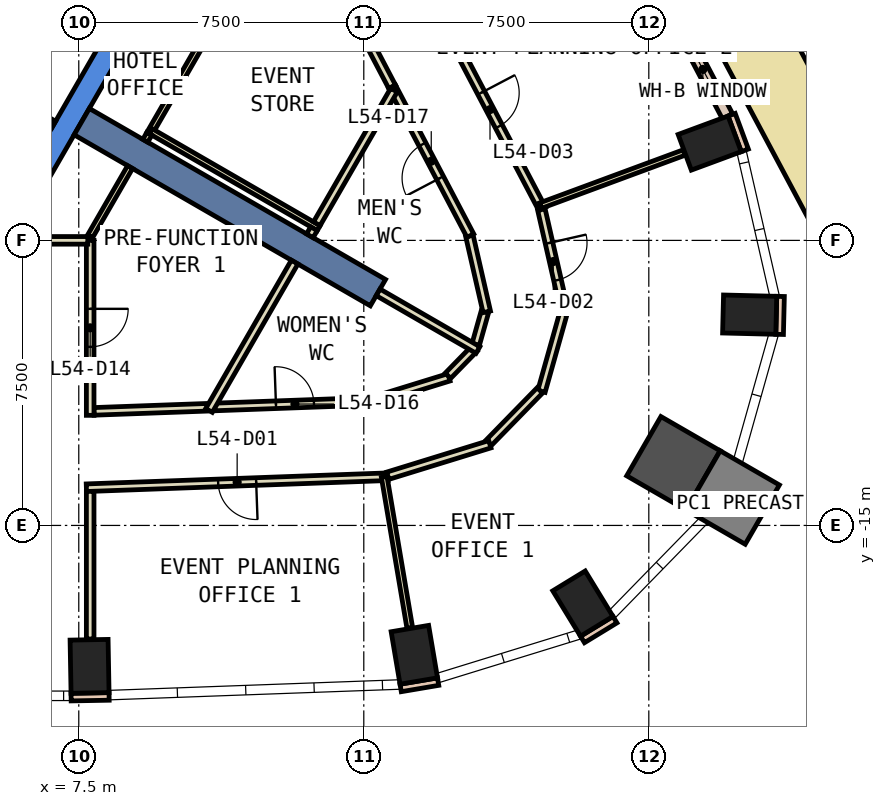
"""IFC4 building model, lengths in metres.
Left out: names, types, materials, properties, quantities, classifications, styles, units other than length and angle.
Written with IfcOpenShell. Run it as: python <this file> out.ifc"""

import sys

from ifc_helpers import new_model, si_unit, direction, frame, frame_2d, origin, origin_2d, place, context, subcontext, project, spatial, polyline, rectangle, outline, extrude, element, fill, save


model = new_model("IFC4")
c1 = context("Model", 3, precision=1e-05, world=origin(), true_north=direction((0.0, 1.0)))
c2 = subcontext(c1, "Body", "Model", "MODEL_VIEW")
j1 = project(units=[si_unit("LENGTHUNIT", "METRE"), si_unit("PLANEANGLEUNIT", "RADIAN")], contexts=[c1])
p1 = place(None, origin())
s1 = spatial("IfcSite", under=j1, at=p1, CompositionType="ELEMENT")
p2 = place(p1, origin())
s2 = spatial("IfcBuilding", under=s1, at=p2, CompositionType="ELEMENT")
p3 = place(p2, frame((0.0, 0.0, 241.4)))
s3 = spatial("IfcBuildingStorey", under=s2, at=p3, CompositionType="ELEMENT", Elevation=241.4)
for number, where, z_axis, x_axis in (
    (1, (7.784, -18.708, 0.0), (0.0, 0.0, 1.0), (1.0, 0.018, 0.0)),
    (2, (16.33, -18.404, 0.0), (0.0, 0.0, 1.0), (0.986, 0.167, 0.0)),
    (3, (20.765, -17.057, 0.0), (0.0, 0.0, 1.0), (0.853, 0.521, 0.0)),
):
    element("IfcColumn", number, at=place(p3, frame(where, z_axis=z_axis, x_axis=x_axis)), inside=s3, PredefinedType="COLUMN", context=c2, shape_type="SweptSolid", body=[
        extrude(rectangle(XDim=1.0, YDim=1.4, at=origin_2d()), origin(), (0.0, 0.0, 1.0), 3.26),
    ])
p4 = place(p3, frame((23.148, -13.365, 0.0), z_axis=(0.0, 0.0, 1.0), x_axis=(-0.866025403784, 0.5, 0.0)))
e4 = element("IfcColumn", 4, at=p4, inside=s3, PredefinedType="COLUMN", context=c2, shape_type="SweptSolid", body=[
    extrude(rectangle(XDim=1.8, YDim=1.8, at=origin_2d()), origin(), (0.0, 0.0, 1.0), 3.26),
])
for number, where, z_axis, x_axis in (
    (5, (25.154, -9.454, 0.0), (0.0, 0.0, 1.0), (0.025, 1.0, 0.0)),
    (6, (24.102, -4.939, 0.0), (0.0, 0.0, 1.0), (-0.347, 0.938, 0.0)),
):
    element("IfcColumn", number, at=place(p3, frame(where, z_axis=z_axis, x_axis=x_axis)), inside=s3, PredefinedType="COLUMN", context=c2, shape_type="SweptSolid", body=[
        extrude(rectangle(XDim=1.0, YDim=1.4, at=origin_2d()), origin(), (0.0, 0.0, 1.0), 3.26),
    ])
p5 = place(p3, frame((24.707, -14.265, 0.0), z_axis=(0.0, 0.0, 1.0), x_axis=(-0.866025403784, 0.5, 0.0)))
e7 = element("IfcColumn", 7, at=p5, inside=s3, PredefinedType="COLUMN", context=c2, shape_type="SweptSolid", body=[
    extrude(rectangle(XDim=1.8, YDim=1.8, at=origin_2d()), origin(), (0.0, 0.0, 1.0), 3.26),
])
p6 = place(p3, frame((0.0, 0.0, -0.6)))
e8 = element("IfcWall", 8, at=p6, inside=s3, PredefinedType="SHEAR", context=c2, shape_type="SweptSolid", body=[
    extrude(outline(polyline([(5.774, -7.5), (11.547, 2.5), (10.854, 2.5), (5.427, -6.9), (5.774, -7.5)])), origin(), (0.0, 0.0, 1.0), 3.86),
])
p7 = place(p3, frame((7.578, -4.375, -0.6), z_axis=(0.0, 0.0, 1.0), x_axis=(0.866024315419, -0.5000018851, 0.0)))
e9 = element("IfcWall", 9, at=p7, inside=s3, PredefinedType="SHEAR", context=c2, shape_type="SweptSolid", body=[
    extrude(rectangle(XDim=9.0, YDim=0.8, at=frame_2d((4.5, 0.0))), origin(), (0.0, 0.0, 1.0), 3.86),
])
p8 = place(p3, frame((25.026, -5.131, 0.0), z_axis=(0.0, 0.0, 1.0), x_axis=(-0.346892928577, 0.937904737222, 0.0)))
e10 = element("IfcWall", 10, at=p8, inside=s3, PredefinedType="STANDARD", context=c2, shape_type="SweptSolid", body=[
    extrude(rectangle(XDim=1.0, YDim=0.2, at=frame_2d((0.5, 0.0))), origin(), (0.0, 0.0, 1.0), 3.26),
])
for number, where, z_axis, x_axis in (
    (11, (7.298, -19.517, 0.0), (0.0, 0.0, 1.0), (1.0, 0.018, 0.0)),
    (12, (15.97, -19.276, 0.0), (0.0, 0.0, 1.0), (0.986, 0.167, 0.0)),
):
    element("IfcWall", number, at=place(p3, frame(where, z_axis=z_axis, x_axis=x_axis)), inside=s3, PredefinedType="STANDARD", context=c2, shape_type="SweptSolid", body=[
        extrude(rectangle(XDim=1.0, YDim=0.2, at=frame_2d((0.5, 0.0))), origin(), (0.0, 0.0, 1.0), 3.26),
    ])
p9 = place(p3, frame((20.755, -18.0, 0.0), z_axis=(0.0, 0.0, 1.0), x_axis=(0.853679739553, 0.520798331677, 0.0)))
e13 = element("IfcWall", 13, at=p9, inside=s3, PredefinedType="STANDARD", context=c2, shape_type="SweptSolid", body=[
    extrude(rectangle(XDim=1.0, YDim=0.2, at=frame_2d((0.5, 0.0))), origin(), (0.0, 0.0, 1.0), 3.26),
])
p10 = place(p3, frame((25.942, -9.973, 0.0), z_axis=(0.0, 0.0, 1.0), x_axis=(0.024192379573, 0.999707321555, 0.0)))
e14 = element("IfcWall", 14, at=p10, inside=s3, PredefinedType="STANDARD", context=c2, shape_type="SweptSolid", body=[
    extrude(rectangle(XDim=0.999, YDim=0.2, at=frame_2d((0.5, 0.0))), origin(), (0.0, 0.0, 1.0), 3.26),
])
p11 = place(p3, frame((24.57, -4.234, 0.0), z_axis=(0.0, 0.0, 1.0), x_axis=(-0.465228032148, 0.885190871001, 0.0)))
e15 = element("IfcWall", 15, at=p11, inside=s3, PredefinedType="STANDARD", context=c2, shape_type="SweptSolid", body=[
    extrude(rectangle(XDim=5.572, YDim=0.3, at=frame_2d((2.786, 0.0))), origin(), (0.0, 0.0, 1.0), 3.26),
])
p12 = place(p11, frame((0.693, 0.0, 0.9)))
e16 = element("IfcOpeningElement", 16, at=p12, cuts=e15, PredefinedType="OPENING", context=c2, shape_type="SweptSolid", body=[
    extrude(rectangle(XDim=1.4, YDim=2.0, at=frame_2d((0.7, 1.0))), frame((0.0, 0.16, 0.0), z_axis=(0.0, -1.0, 0.0), x_axis=(1.0, 0.0, 0.0)), (0.0, 0.0, 1.0), 0.32),
])
p13 = place(p11, frame((3.479, 0.0, 0.9)))
e17 = element("IfcOpeningElement", 17, at=p13, cuts=e15, PredefinedType="OPENING", context=c2, shape_type="SweptSolid", body=[
    extrude(rectangle(XDim=1.4, YDim=2.0, at=frame_2d((0.7, 1.0))), frame((0.0, 0.16, 0.0), z_axis=(0.0, -1.0, 0.0), x_axis=(1.0, 0.0, 0.0)), (0.0, 0.0, 1.0), 0.32),
])
p14 = place(p3, frame((27.604, -6.606, 0.0), z_axis=(0.0, 0.0, 1.0), x_axis=(-0.470628729942, 0.882331342837, 0.0)))
e18 = element("IfcWall", 18, at=p14, inside=s3, PredefinedType="STANDARD", context=c2, shape_type="SweptSolid", body=[
    extrude(rectangle(XDim=5.946, YDim=1.9, at=frame_2d((2.973, 0.0))), origin(), (0.0, 0.0, 1.0), 0.8),
])
p15 = place(p3, frame((7.9, -11.999, 0.0), z_axis=(0.0, 0.0, 1.0), x_axis=(0.999343711998, 0.036223546064, 0.0)))
e19 = element("IfcWall", 19, at=p15, inside=s3, PredefinedType="PARTITIONING", context=c2, shape_type="SweptSolid", body=[
    extrude(rectangle(XDim=2.979, YDim=0.2, at=frame_2d((1.49, 0.0))), origin(), (0.0, 0.0, 1.0), 3.26),
])
p16 = place(p3, frame((15.746, -3.458, 0.0), z_axis=(0.0, 0.0, 1.0), x_axis=(-0.464794189951, 0.885418748948, 0.0)))
e20 = element("IfcWall", 20, at=p16, inside=s3, PredefinedType="PARTITIONING", context=c2, shape_type="SweptSolid", body=[
    extrude(rectangle(XDim=1.205, YDim=0.2, at=frame_2d((0.603, 0.0))), origin(), (0.0, 0.0, 1.0), 3.26),
])
p17 = place(p3, frame((11.077, -11.883, 0.0), z_axis=(0.0, 0.0, 1.0), x_axis=(0.999335333519, 0.036453959732, 0.0)))
e21 = element("IfcWall", 21, at=p17, inside=s3, PredefinedType="PARTITIONING", context=c2, shape_type="SweptSolid", body=[
    extrude(rectangle(XDim=4.226, YDim=0.2, at=frame_2d((2.113, 0.0))), origin(), (0.0, 0.0, 1.0), 3.26),
])
p18 = place(p17, frame((1.613, 0.0, 0.0)))
e22 = element("IfcOpeningElement", 22, at=p18, cuts=e21, PredefinedType="OPENING", context=c2, shape_type="SweptSolid", body=[
    extrude(rectangle(XDim=1.0, YDim=2.1, at=frame_2d((0.5, 1.05))), frame((0.0, 0.11, 0.0), z_axis=(0.0, -1.0, 0.0), x_axis=(1.0, 0.0, 0.0)), (0.0, 0.0, 1.0), 0.22),
])
p19 = place(p3, frame((15.295, -11.703, 0.0), z_axis=(0.0, 0.0, 1.0), x_axis=(0.95563113363, 0.294566013716, 0.0)))
e23 = element("IfcWall", 23, at=p19, inside=s3, PredefinedType="PARTITIONING", context=c2, shape_type="SweptSolid", body=[
    extrude(rectangle(XDim=2.036, YDim=0.2, at=frame_2d((1.018, 0.0))), origin(), (0.0, 0.0, 1.0), 3.26),
])
p20 = place(p3, frame((17.215, -11.061, 0.0), z_axis=(0.0, 0.0, 1.0), x_axis=(0.698527813511, 0.715582904877, 0.0)))
e24 = element("IfcWall", 24, at=p20, inside=s3, PredefinedType="PARTITIONING", context=c2, shape_type="SweptSolid", body=[
    extrude(rectangle(XDim=1.002, YDim=0.2, at=frame_2d((0.501, 0.0))), origin(), (0.0, 0.0, 1.0), 3.26),
])
p21 = place(p3, frame((17.945, -10.238, 0.0), z_axis=(0.0, 0.0, 1.0), x_axis=(0.270785141481, 0.962639811743, 0.0)))
e25 = element("IfcWall", 25, at=p21, inside=s3, PredefinedType="PARTITIONING", context=c2, shape_type="SweptSolid", body=[
    extrude(rectangle(XDim=0.894, YDim=0.2, at=frame_2d((0.447, 0.0))), origin(), (0.0, 0.0, 1.0), 3.26),
])
p22 = place(p3, frame((18.236, -9.379, 0.0), z_axis=(0.0, 0.0, 1.0), x_axis=(-0.222760041204, 0.974873306662, 0.0)))
e26 = element("IfcWall", 26, at=p22, inside=s3, PredefinedType="PARTITIONING", context=c2, shape_type="SweptSolid", body=[
    extrude(rectangle(XDim=2.047, YDim=0.2, at=frame_2d((1.024, 0.0))), origin(), (0.0, 0.0, 1.0), 3.26),
])
p23 = place(p3, frame((17.804, -7.374, 0.0), z_axis=(0.0, 0.0, 1.0), x_axis=(-0.465179971699, 0.885216128372, 0.0)))
e27 = element("IfcWall", 27, at=p23, inside=s3, PredefinedType="PARTITIONING", context=c2, shape_type="SweptSolid", body=[
    extrude(rectangle(XDim=4.424, YDim=0.2, at=frame_2d((2.212, 0.0))), origin(), (0.0, 0.0, 1.0), 3.26),
])
p24 = place(p23, frame((1.712, 0.0, 0.0)))
e28 = element("IfcOpeningElement", 28, at=p24, cuts=e27, PredefinedType="OPENING", context=c2, shape_type="SweptSolid", body=[
    extrude(rectangle(XDim=1.0, YDim=2.1, at=frame_2d((0.5, 1.05))), frame((0.0, 0.11, 0.0), z_axis=(0.0, -1.0, 0.0), x_axis=(1.0, 0.0, 0.0)), (0.0, 0.0, 1.0), 0.22),
])
p25 = place(p3, frame((15.636, -13.718, 0.0), z_axis=(0.0, 0.0, 1.0), x_axis=(-0.99933282306, -0.036522715615, 0.0)))
e29 = element("IfcWall", 29, at=p25, inside=s3, PredefinedType="PARTITIONING", context=c2, shape_type="SweptSolid", body=[
    extrude(rectangle(XDim=7.941, YDim=0.2, at=frame_2d((3.971, 0.0))), origin(), (0.0, 0.0, 1.0), 3.26),
])
p26 = place(p25, frame((3.471, 0.0, 0.0)))
e30 = element("IfcOpeningElement", 30, at=p26, cuts=e29, PredefinedType="OPENING", context=c2, shape_type="SweptSolid", body=[
    extrude(rectangle(XDim=1.0, YDim=2.1, at=frame_2d((0.5, 1.05))), frame((0.0, 0.11, 0.0), z_axis=(0.0, -1.0, 0.0), x_axis=(1.0, 0.0, 0.0)), (0.0, 0.0, 1.0), 0.22),
])
p27 = place(p3, frame((19.672, -6.683, 0.0), z_axis=(0.0, 0.0, 1.0), x_axis=(0.222523624687, -0.974927298036, 0.0)))
e31 = element("IfcWall", 31, at=p27, inside=s3, PredefinedType="PARTITIONING", context=c2, shape_type="SweptSolid", body=[
    extrude(rectangle(XDim=2.817, YDim=0.2, at=frame_2d((1.409, 0.0))), origin(), (0.0, 0.0, 1.0), 3.26),
])
p28 = place(p27, frame((0.909, 0.0, 0.0)))
e32 = element("IfcOpeningElement", 32, at=p28, cuts=e31, PredefinedType="OPENING", context=c2, shape_type="SweptSolid", body=[
    extrude(rectangle(XDim=1.0, YDim=2.1, at=frame_2d((0.5, 1.05))), frame((0.0, 0.11, 0.0), z_axis=(0.0, -1.0, 0.0), x_axis=(1.0, 0.0, 0.0)), (0.0, 0.0, 1.0), 0.22),
])
p29 = place(p3, frame((20.25, -9.429, 0.0), z_axis=(0.0, 0.0, 1.0), x_axis=(-0.270905475888, -0.962605954238, 0.0)))
e33 = element("IfcWall", 33, at=p29, inside=s3, PredefinedType="PARTITIONING", context=c2, shape_type="SweptSolid", body=[
    extrude(rectangle(XDim=2.122, YDim=0.2, at=frame_2d((1.061, 0.0))), origin(), (0.0, 0.0, 1.0), 3.26),
])
p30 = place(p3, frame((19.633, -11.447, 0.0), z_axis=(0.0, 0.0, 1.0), x_axis=(-0.698477855606, -0.715631668687, 0.0)))
e34 = element("IfcWall", 34, at=p30, inside=s3, PredefinedType="PARTITIONING", context=c2, shape_type="SweptSolid", body=[
    extrude(rectangle(XDim=1.921, YDim=0.2, at=frame_2d((0.961, 0.0))), origin(), (0.0, 0.0, 1.0), 3.26),
])
p31 = place(p3, frame((18.317, -12.864, 0.0), z_axis=(0.0, 0.0, 1.0), x_axis=(-0.955600342663, -0.294665887239, 0.0)))
e35 = element("IfcWall", 35, at=p31, inside=s3, PredefinedType="PARTITIONING", context=c2, shape_type="SweptSolid", body=[
    extrude(rectangle(XDim=2.81, YDim=0.2, at=frame_2d((1.405, 0.0))), origin(), (0.0, 0.0, 1.0), 3.26),
])
p32 = place(p3, frame((16.947, -1.443, 0.0), z_axis=(0.0, 0.0, 1.0), x_axis=(0.465133414481, -0.88524059257, 0.0)))
e36 = element("IfcWall", 36, at=p32, inside=s3, PredefinedType="PARTITIONING", context=c2, shape_type="SweptSolid", body=[
    extrude(rectangle(XDim=5.91, YDim=0.2, at=frame_2d((2.955, 0.0))), origin(), (0.0, 0.0, 1.0), 3.26),
])
p33 = place(p32, frame((2.455, 0.0, 0.0)))
e37 = element("IfcOpeningElement", 37, at=p33, cuts=e36, PredefinedType="OPENING", context=c2, shape_type="SweptSolid", body=[
    extrude(rectangle(XDim=1.0, YDim=2.1, at=frame_2d((0.5, 1.05))), frame((0.0, 0.11, 0.0), z_axis=(0.0, -1.0, 0.0), x_axis=(1.0, 0.0, 0.0)), (0.0, 0.0, 1.0), 0.22),
])
p34 = place(p3, frame((5.751, -3.938, 0.0), z_axis=(0.0, 0.0, 1.0), x_axis=(0.500034260056, 0.866005622828, 0.0)))
e38 = element("IfcWall", 38, at=p34, inside=s3, PredefinedType="PARTITIONING", context=c2, shape_type="SweptSolid", body=[
    extrude(rectangle(XDim=5.399, YDim=0.2, at=frame_2d((2.7, 0.0))), origin(), (0.0, 0.0, 1.0), 3.26),
])
p35 = place(p3, frame((6.841, -4.452, 0.0), z_axis=(0.0, 0.0, 1.0), x_axis=(-0.86621513555, 0.499671230855, 0.0)))
e39 = element("IfcWall", 39, at=p35, inside=s3, PredefinedType="PARTITIONING", context=c2, shape_type="SweptSolid", body=[
    extrude(rectangle(XDim=1.1, YDim=0.2, at=frame_2d((0.55, 0.0))), origin(), (0.0, 0.0, 1.0), 3.26),
])
p36 = place(p3, frame((7.8, -7.39, 0.0), z_axis=(0.0, 0.0, 1.0), x_axis=(0.499977374825, 0.866038466041, 0.0)))
e40 = element("IfcWall", 40, at=p36, inside=s3, PredefinedType="PARTITIONING", context=c2, shape_type="SweptSolid", body=[
    extrude(rectangle(XDim=2.1, YDim=0.15, at=frame_2d((1.05, 0.0))), origin(), (0.0, 0.0, 1.0), 3.26),
])
p37 = place(p3, frame((9.358, -4.692, 0.0), z_axis=(0.0, 0.0, 1.0), x_axis=(0.500027777314, 0.866009365951, 0.0)))
e41 = element("IfcWall", 41, at=p37, inside=s3, PredefinedType="PARTITIONING", context=c2, shape_type="SweptSolid", body=[
    extrude(rectangle(XDim=7.36, YDim=0.15, at=frame_2d((3.68, 0.0))), origin(), (0.0, 0.0, 1.0), 3.26),
])
p38 = place(p3, frame((7.8, -7.499, 0.0), z_axis=(0.0, 0.0, 1.0), x_axis=(0.0, -1.0, 0.0)))
e42 = element("IfcWall", 42, at=p38, inside=s3, PredefinedType="PARTITIONING", context=c2, shape_type="SweptSolid", body=[
    extrude(rectangle(XDim=4.604, YDim=0.2, at=frame_2d((2.302, 0.0))), origin(), (0.0, 0.0, 1.0), 3.26),
])
p39 = place(p38, frame((1.802, 0.0, 0.0)))
e43 = element("IfcOpeningElement", 43, at=p39, cuts=e42, PredefinedType="OPENING", context=c2, shape_type="SweptSolid", body=[
    extrude(rectangle(XDim=1.0, YDim=2.1, at=frame_2d((0.5, 1.05))), frame((0.0, 0.11, 0.0), z_axis=(0.0, -1.0, 0.0), x_axis=(1.0, 0.0, 0.0)), (0.0, 0.0, 1.0), 0.22),
])
p40 = place(p3, frame((7.8, -14.104, 0.0), z_axis=(0.0, 0.0, 1.0), x_axis=(0.0, -1.0, 0.0)))
e44 = element("IfcWall", 44, at=p40, inside=s3, PredefinedType="PARTITIONING", context=c2, shape_type="SweptSolid", body=[
    extrude(rectangle(XDim=3.884, YDim=0.2, at=frame_2d((1.942, 0.0))), origin(), (0.0, 0.0, 1.0), 3.26),
])
p41 = place(p3, frame((9.395, -4.627, 0.0), z_axis=(0.0, 0.0, 1.0), x_axis=(0.866034131428, -0.499984882974, 0.0)))
e45 = element("IfcWall", 45, at=p41, inside=s3, PredefinedType="PARTITIONING", context=c2, shape_type="SweptSolid", body=[
    extrude(rectangle(XDim=5.1, YDim=0.15, at=frame_2d((2.55, 0.0))), origin(), (0.0, 0.0, 1.0), 3.26),
])
p42 = place(p3, frame((13.18, -8.071, 0.0), z_axis=(0.0, 0.0, 1.0), x_axis=(-0.499914724673, -0.86607463192, 0.0)))
e46 = element("IfcWall", 46, at=p42, inside=s3, PredefinedType="PARTITIONING", context=c2, shape_type="SweptSolid", body=[
    extrude(rectangle(XDim=4.507, YDim=0.2, at=frame_2d((2.253, 0.0))), origin(), (0.0, 0.0, 1.0), 3.26),
])
p43 = place(p3, frame((13.688, -7.192, 0.0), z_axis=(0.0, 0.0, 1.0), x_axis=(-0.499787711288, -0.866147934042, 0.0)))
e47 = element("IfcWall", 47, at=p43, inside=s3, PredefinedType="PARTITIONING", context=c2, shape_type="SweptSolid", body=[
    extrude(rectangle(XDim=0.216, YDim=0.2, at=frame_2d((0.108, 0.0))), origin(), (0.0, 0.0, 1.0), 3.26),
])
p44 = place(p3, frame((15.793, -3.546, 0.0), z_axis=(0.0, 0.0, 1.0), x_axis=(-0.500000064182, -0.866025366729, 0.0)))
e48 = element("IfcWall", 48, at=p44, inside=s3, PredefinedType="PARTITIONING", context=c2, shape_type="SweptSolid", body=[
    extrude(rectangle(XDim=4.06, YDim=0.2, at=frame_2d((2.03, 0.0))), origin(), (0.0, 0.0, 1.0), 3.26),
])
p45 = place(p3, frame((15.377, -8.867, 0.0), z_axis=(0.0, 0.0, 1.0), x_axis=(0.865965767548, -0.500103278768, 0.0)))
e49 = element("IfcWall", 49, at=p45, inside=s3, PredefinedType="PARTITIONING", context=c2, shape_type="SweptSolid", body=[
    extrude(rectangle(XDim=3.033, YDim=0.2, at=frame_2d((1.517, 0.0))), origin(), (0.0, 0.0, 1.0), 3.26),
])
p46 = place(p3, frame((15.537, -13.722, 0.0), z_axis=(0.0, 0.0, 1.0), x_axis=(0.167012380144, -0.985954798598, 0.0)))
e50 = element("IfcWall", 50, at=p46, inside=s3, PredefinedType="PARTITIONING", context=c2, shape_type="SweptSolid", body=[
    extrude(rectangle(XDim=4.029, YDim=0.15, at=frame_2d((2.014, 0.0))), origin(), (0.0, 0.0, 1.0), 3.26),
])
p47 = place(p3, frame((19.649, -6.586, 0.0), z_axis=(0.0, 0.0, 1.0), x_axis=(0.937935790958, 0.346808956114, 0.0)))
e51 = element("IfcWall", 51, at=p47, inside=s3, PredefinedType="PARTITIONING", context=c2, shape_type="SweptSolid", body=[
    extrude(rectangle(XDim=4.028, YDim=0.15, at=frame_2d((2.014, 0.0))), origin(), (0.0, 0.0, 1.0), 3.26),
])
p48 = place(p3, frame((9.25, -4.879, 0.0), z_axis=(0.0, 0.0, 1.0), x_axis=(0.499787711288, 0.866147934042, 0.0)))
e52 = element("IfcWall", 52, at=p48, inside=s3, PredefinedType="PARTITIONING", context=c2, shape_type="SweptSolid", body=[
    extrude(rectangle(XDim=0.216, YDim=0.15, at=frame_2d((0.108, 0.0))), origin(), (0.0, 0.0, 1.0), 3.26),
])
p49 = place(p3, frame((5.944, -7.499, 0.0), z_axis=(0.0, 0.0, 1.0), x_axis=(1.0, 0.0, 0.0)))
e53 = element("IfcWall", 53, at=p49, inside=s3, PredefinedType="PARTITIONING", context=c2, shape_type="SweptSolid", body=[
    extrude(rectangle(XDim=1.793, YDim=0.2, at=frame_2d((0.896, 0.0))), origin(), (0.0, 0.0, 1.0), 3.26),
])
p50 = place(p3, frame((5.492, -3.788, 0.0), z_axis=(0.0, 0.0, 1.0), x_axis=(0.500034260056, 0.866005622828, 0.0)))
e54 = element("IfcWall", 54, at=p50, inside=s3, PredefinedType="STANDARD", context=c2, shape_type="SweptSolid", body=[
    extrude(rectangle(XDim=5.399, YDim=0.2, at=frame_2d((2.7, 0.0))), origin(), (0.0, 0.0, 1.0), 3.26),
])
p51 = place(p12, origin())
e55 = element("IfcWindow", 55, at=p51, inside=s3, PartitioningType="SINGLE_PANEL", PredefinedType="WINDOW", context=c2, shape_type="SweptSolid", body=[
    extrude(rectangle(XDim=1.4, YDim=2.0, at=frame_2d((0.7, 1.0))), frame((0.0, 0.03, 0.0), z_axis=(0.0, -1.0, 0.0), x_axis=(1.0, 0.0, 0.0)), (0.0, 0.0, 1.0), 0.06),
])
fill(e16, e55)
p52 = place(p26, origin())
e56 = element("IfcDoor", 56, at=p52, inside=s3, OperationType="SINGLE_SWING_RIGHT", PredefinedType="DOOR", context=c2, shape_type="SweptSolid", body=[
    extrude(rectangle(XDim=1.0, YDim=2.1, at=frame_2d((0.5, 1.05))), frame((0.0, 0.025, 0.0), z_axis=(0.0, -1.0, 0.0), x_axis=(1.0, 0.0, 0.0)), (0.0, 0.0, 1.0), 0.05),
])
fill(e30, e56)
p53 = place(p28, origin())
e57 = element("IfcDoor", 57, at=p53, inside=s3, OperationType="SINGLE_SWING_LEFT", PredefinedType="DOOR", context=c2, shape_type="SweptSolid", body=[
    extrude(rectangle(XDim=1.0, YDim=2.1, at=frame_2d((0.5, 1.05))), frame((0.0, 0.025, 0.0), z_axis=(0.0, -1.0, 0.0), x_axis=(1.0, 0.0, 0.0)), (0.0, 0.0, 1.0), 0.05),
])
fill(e32, e57)
p54 = place(p33, origin())
e58 = element("IfcDoor", 58, at=p54, inside=s3, OperationType="SINGLE_SWING_LEFT", PredefinedType="DOOR", context=c2, shape_type="SweptSolid", body=[
    extrude(rectangle(XDim=1.0, YDim=2.1, at=frame_2d((0.5, 1.05))), frame((0.0, 0.025, 0.0), z_axis=(0.0, -1.0, 0.0), x_axis=(1.0, 0.0, 0.0)), (0.0, 0.0, 1.0), 0.05),
])
fill(e37, e58)
p55 = place(p39, origin())
e59 = element("IfcDoor", 59, at=p55, inside=s3, OperationType="SINGLE_SWING_LEFT", PredefinedType="DOOR", context=c2, shape_type="SweptSolid", body=[
    extrude(rectangle(XDim=1.0, YDim=2.1, at=frame_2d((0.5, 1.05))), frame((0.0, 0.025, 0.0), z_axis=(0.0, -1.0, 0.0), x_axis=(1.0, 0.0, 0.0)), (0.0, 0.0, 1.0), 0.05),
])
fill(e43, e59)
p56 = place(p18, origin())
e60 = element("IfcDoor", 60, at=p56, inside=s3, OperationType="SINGLE_SWING_LEFT", PredefinedType="DOOR", context=c2, shape_type="SweptSolid", body=[
    extrude(rectangle(XDim=1.0, YDim=2.1, at=frame_2d((0.5, 1.05))), frame((0.0, 0.025, 0.0), z_axis=(0.0, -1.0, 0.0), x_axis=(1.0, 0.0, 0.0)), (0.0, 0.0, 1.0), 0.05),
])
fill(e22, e60)
p57 = place(p24, origin())
e61 = element("IfcDoor", 61, at=p57, inside=s3, OperationType="SINGLE_SWING_LEFT", PredefinedType="DOOR", context=c2, shape_type="SweptSolid", body=[
    extrude(rectangle(XDim=1.0, YDim=2.1, at=frame_2d((0.5, 1.05))), frame((0.0, 0.025, 0.0), z_axis=(0.0, -1.0, 0.0), x_axis=(1.0, 0.0, 0.0)), (0.0, 0.0, 1.0), 0.05),
])
fill(e28, e61)
save(model, sys.argv[1])
